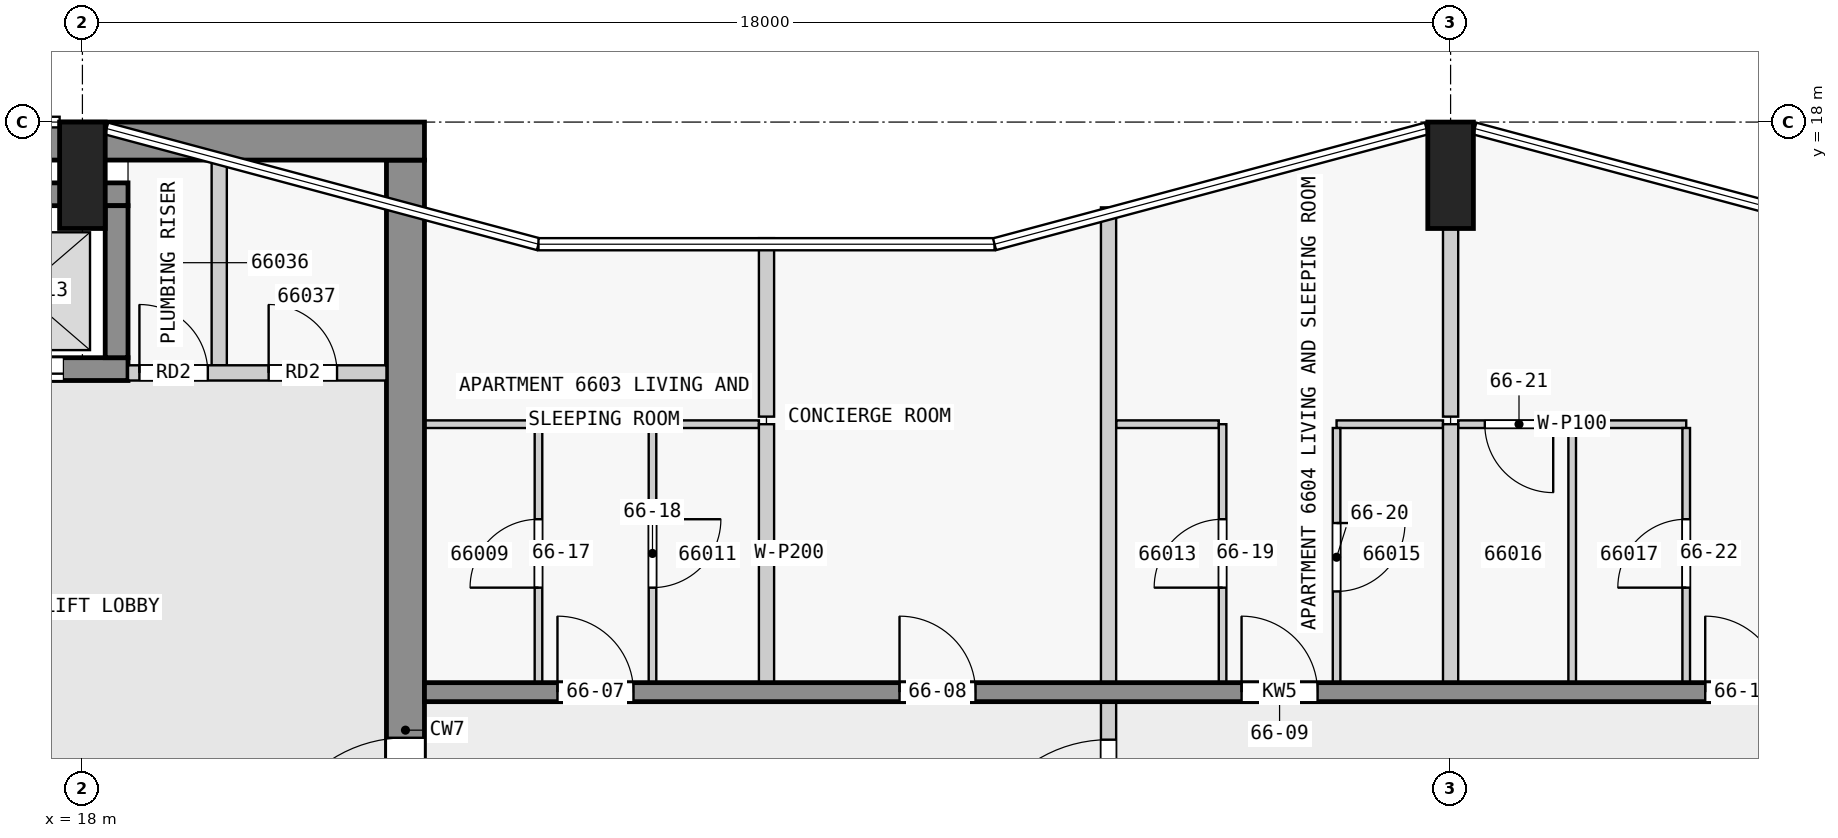
"""IFC4 building model, lengths in metres.
Left out: names, types, materials, properties, quantities, classifications, styles, units other than length and angle.
Written with IfcOpenShell. Run it as: python <this file> out.ifc"""

import sys

from ifc_helpers import new_model, si_unit, direction, frame, frame_2d, origin, origin_2d, place, context, subcontext, project, spatial, rectangle, extrude, element, fill, save


model = new_model("IFC4")
c1 = context("Model", 3, precision=1e-05, world=origin(), true_north=direction((0.0, 1.0)))
c2 = subcontext(c1, "Body", "Model", "MODEL_VIEW")
j1 = project(units=[si_unit("LENGTHUNIT", "METRE"), si_unit("PLANEANGLEUNIT", "RADIAN")], contexts=[c1])
p1 = place(None, origin())
s1 = spatial("IfcSite", under=j1, at=p1, CompositionType="ELEMENT")
p2 = place(p1, origin())
s2 = spatial("IfcBuilding", under=s1, at=p2, CompositionType="ELEMENT")
p3 = place(p2, frame((0.0, 0.0, 252.9)))
s3 = spatial("IfcBuildingStorey", under=s2, at=p3, CompositionType="ELEMENT", Elevation=252.9)
for number, where, z_axis, x_axis in (
    (1, (36.0, 17.3, 0.0), (0.0, 0.0, 1.0), (1.0, 0.0, 0.0)),
    (2, (18.0, 17.3, 0.0), (0.0, 0.0, 1.0), (1.0, 0.0, 0.0)),
):
    element("IfcColumn", number, at=place(p3, frame(where, z_axis=z_axis, x_axis=x_axis)), inside=s3, PredefinedType="COLUMN", context=c2, shape_type="SweptSolid", body=[
        extrude(rectangle(XDim=0.6, YDim=1.4, at=origin_2d()), origin(), (0.0, 0.0, 1.0), 3.5),
    ])
p4 = place(p3, frame((1.8, 17.75, 0.0), z_axis=(0.0, 0.0, 1.0), x_axis=(1.0, 0.0, 0.0)))
e3 = element("IfcWall", 3, at=p4, inside=s3, PredefinedType="SHEAR", context=c2, shape_type="SweptSolid", body=[
    extrude(rectangle(XDim=20.7, YDim=0.5, at=frame_2d((10.35, 0.0))), origin(), (0.0, 0.0, 1.0), 3.25),
])
p5 = place(p3, frame((22.25, 2.5, 0.0), z_axis=(0.0, 0.0, 1.0), x_axis=(0.0, 1.0, 0.0)))
e4 = element("IfcWall", 4, at=p5, inside=s3, PredefinedType="SHEAR", context=c2, shape_type="SweptSolid", body=[
    extrude(rectangle(XDim=15.0, YDim=0.5, at=frame_2d((7.5, 0.0))), origin(), (0.0, 0.0, 1.0), 3.25),
])
p6 = place(p5, frame((5.6, 0.0, 0.0)))
e5 = element("IfcOpeningElement", 5, at=p6, cuts=e4, PredefinedType="OPENING", context=c2, shape_type="SweptSolid", body=[
    extrude(rectangle(XDim=1.8, YDim=2.1, at=frame_2d((0.9, 1.05))), frame((0.0, 0.26, 0.0), z_axis=(0.0, -1.0, 0.0), x_axis=(1.0, 0.0, 0.0)), (0.0, 0.0, 1.0), 0.52),
])
p7 = place(p3, frame((10.8, 17.05, 0.0), z_axis=(0.0, 0.0, 1.0), x_axis=(1.0, 0.0, 0.0)))
e6 = element("IfcWall", 6, at=p7, inside=s3, PredefinedType="SHEAR", context=c2, shape_type="SweptSolid", body=[
    extrude(rectangle(XDim=7.8, YDim=0.3, at=frame_2d((3.9, 0.0))), origin(), (0.0, 0.0, 1.0), 3.25),
])
p8 = place(p3, frame((10.8, 14.75, 0.0), z_axis=(0.0, 0.0, 1.0), x_axis=(1.0, 0.0, 0.0)))
e7 = element("IfcWall", 7, at=p8, inside=s3, PredefinedType="SHEAR", context=c2, shape_type="SweptSolid", body=[
    extrude(rectangle(XDim=7.8, YDim=0.3, at=frame_2d((3.9, 0.0))), origin(), (0.0, 0.0, 1.0), 3.25),
])
p9 = place(p8, frame((0.85, 0.0, 0.0)))
e8 = element("IfcOpeningElement", 8, at=p9, cuts=e7, PredefinedType="OPENING", context=c2, shape_type="SweptSolid", body=[
    extrude(rectangle(XDim=1.1, YDim=2.1, at=frame_2d((0.55, 1.05))), frame((0.0, 0.16, 0.0), z_axis=(0.0, -1.0, 0.0), x_axis=(1.0, 0.0, 0.0)), (0.0, 0.0, 1.0), 0.32),
])
p10 = place(p8, frame((3.35, 0.0, 0.0)))
e9 = element("IfcOpeningElement", 9, at=p10, cuts=e7, PredefinedType="OPENING", context=c2, shape_type="SweptSolid", body=[
    extrude(rectangle(XDim=1.1, YDim=2.1, at=frame_2d((0.55, 1.05))), frame((0.0, 0.16, 0.0), z_axis=(0.0, -1.0, 0.0), x_axis=(1.0, 0.0, 0.0)), (0.0, 0.0, 1.0), 0.32),
])
p11 = place(p8, frame((5.85, 0.0, 0.0)))
e10 = element("IfcOpeningElement", 10, at=p11, cuts=e7, PredefinedType="OPENING", context=c2, shape_type="SweptSolid", body=[
    extrude(rectangle(XDim=1.1, YDim=2.1, at=frame_2d((0.55, 1.05))), frame((0.0, 0.16, 0.0), z_axis=(0.0, -1.0, 0.0), x_axis=(1.0, 0.0, 0.0)), (0.0, 0.0, 1.0), 0.32),
])
p12 = place(p3, frame((18.45, 14.9, 0.0), z_axis=(0.0, 0.0, 1.0), x_axis=(0.0, 1.0, 0.0)))
e11 = element("IfcWall", 11, at=p12, inside=s3, PredefinedType="SHEAR", context=c2, shape_type="SweptSolid", body=[
    extrude(rectangle(XDim=2.0, YDim=0.3, at=frame_2d((1.0, 0.0))), origin(), (0.0, 0.0, 1.0), 3.25),
])
p13 = place(p3, frame((22.5, 10.5, 0.0), z_axis=(0.0, 0.0, 1.0), x_axis=(1.0, 0.0, 0.0)))
e12 = element("IfcWall", 12, at=p13, inside=s3, PredefinedType="SHEAR", context=c2, shape_type="SweptSolid", body=[
    extrude(rectangle(XDim=22.5, YDim=0.25, at=frame_2d((11.25, 0.0))), origin(), (0.0, 0.0, 1.0), 3.25),
])
p14 = place(p13, frame((1.75, 0.0, 0.0)))
e13 = element("IfcOpeningElement", 13, at=p14, cuts=e12, PredefinedType="OPENING", context=c2, shape_type="SweptSolid", body=[
    extrude(rectangle(XDim=1.0, YDim=2.1, at=frame_2d((0.5, 1.05))), frame((0.0, 0.135, 0.0), z_axis=(0.0, -1.0, 0.0), x_axis=(1.0, 0.0, 0.0)), (0.0, 0.0, 1.0), 0.27),
])
p15 = place(p13, frame((6.25, 0.0, 0.0)))
e14 = element("IfcOpeningElement", 14, at=p15, cuts=e12, PredefinedType="OPENING", context=c2, shape_type="SweptSolid", body=[
    extrude(rectangle(XDim=1.0, YDim=2.1, at=frame_2d((0.5, 1.05))), frame((0.0, 0.135, 0.0), z_axis=(0.0, -1.0, 0.0), x_axis=(1.0, 0.0, 0.0)), (0.0, 0.0, 1.0), 0.27),
])
p16 = place(p13, frame((10.75, 0.0, 0.0)))
e15 = element("IfcOpeningElement", 15, at=p16, cuts=e12, PredefinedType="OPENING", context=c2, shape_type="SweptSolid", body=[
    extrude(rectangle(XDim=1.0, YDim=2.1, at=frame_2d((0.5, 1.05))), frame((0.0, 0.135, 0.0), z_axis=(0.0, -1.0, 0.0), x_axis=(1.0, 0.0, 0.0)), (0.0, 0.0, 1.0), 0.27),
])
p17 = place(p13, frame((16.85, 0.0, 0.0)))
e16 = element("IfcOpeningElement", 16, at=p17, cuts=e12, PredefinedType="OPENING", context=c2, shape_type="SweptSolid", body=[
    extrude(rectangle(XDim=1.0, YDim=2.1, at=frame_2d((0.5, 1.05))), frame((0.0, 0.135, 0.0), z_axis=(0.0, -1.0, 0.0), x_axis=(1.0, 0.0, 0.0)), (0.0, 0.0, 1.0), 0.27),
])
p18 = place(p3, frame((18.6, 14.7, 0.0), z_axis=(0.0, 0.0, 1.0), x_axis=(1.0, 0.0, 0.0)))
e17 = element("IfcWall", 17, at=p18, inside=s3, PredefinedType="PARTITIONING", context=c2, shape_type="SweptSolid", body=[
    extrude(rectangle(XDim=3.4, YDim=0.2, at=frame_2d((1.7, 0.0))), origin(), (0.0, 0.0, 1.0), 3.25),
])
p19 = place(p18, frame((0.15, 0.0, 0.0)))
e18 = element("IfcOpeningElement", 18, at=p19, cuts=e17, PredefinedType="OPENING", context=c2, shape_type="SweptSolid", body=[
    extrude(rectangle(XDim=0.9, YDim=2.1, at=frame_2d((0.45, 1.05))), frame((0.0, 0.11, 0.0), z_axis=(0.0, -1.0, 0.0), x_axis=(1.0, 0.0, 0.0)), (0.0, 0.0, 1.0), 0.22),
])
p20 = place(p18, frame((1.85, 0.0, 0.0)))
e19 = element("IfcOpeningElement", 19, at=p20, cuts=e17, PredefinedType="OPENING", context=c2, shape_type="SweptSolid", body=[
    extrude(rectangle(XDim=0.9, YDim=2.1, at=frame_2d((0.45, 1.05))), frame((0.0, 0.11, 0.0), z_axis=(0.0, -1.0, 0.0), x_axis=(1.0, 0.0, 0.0)), (0.0, 0.0, 1.0), 0.22),
])
p21 = place(p3, frame((19.8, 14.8, 0.0), z_axis=(0.0, 0.0, 1.0), x_axis=(0.0, 1.0, 0.0)))
e20 = element("IfcWall", 20, at=p21, inside=s3, PredefinedType="PARTITIONING", context=c2, shape_type="SweptSolid", body=[
    extrude(rectangle(XDim=2.7, YDim=0.2, at=frame_2d((1.35, 0.0))), origin(), (0.0, 0.0, 1.0), 3.25),
])
p22 = place(p3, frame((23.95, 14.025, 0.0), z_axis=(0.0, 0.0, 1.0), x_axis=(-1.0, 0.0, 0.0)))
e21 = element("IfcWall", 21, at=p22, inside=s3, PredefinedType="PARTITIONING", context=c2, shape_type="SweptSolid", body=[
    extrude(rectangle(XDim=1.45, YDim=0.1, at=frame_2d((0.725, 0.0))), origin(), (0.0, 0.0, 1.0), 3.25),
])
for number, where, z_axis, x_axis in (
    (22, (26.9, 14.025, 0.0), (0.0, 0.0, 1.0), (-1.0, 0.0, 0.0)),
    (23, (32.95, 14.025, 0.0), (0.0, 0.0, 1.0), (-1.0, 0.0, 0.0)),
):
    element("IfcWall", number, at=place(p3, frame(where, z_axis=z_axis, x_axis=x_axis)), inside=s3, PredefinedType="PARTITIONING", context=c2, shape_type="SweptSolid", body=[
        extrude(rectangle(XDim=1.35, YDim=0.1, at=frame_2d((0.675, 0.0))), origin(), (0.0, 0.0, 1.0), 3.25),
    ])
p23 = place(p3, frame((35.9, 14.025, 0.0), z_axis=(0.0, 0.0, 1.0), x_axis=(-1.0, 0.0, 0.0)))
e24 = element("IfcWall", 24, at=p23, inside=s3, PredefinedType="PARTITIONING", context=c2, shape_type="SweptSolid", body=[
    extrude(rectangle(XDim=1.4, YDim=0.1, at=frame_2d((0.7, 0.0))), origin(), (0.0, 0.0, 1.0), 3.25),
])
p24 = place(p3, frame((39.1, 14.025, 0.0), z_axis=(0.0, 0.0, 1.0), x_axis=(-1.0, 0.0, 0.0)))
e25 = element("IfcWall", 25, at=p24, inside=s3, PredefinedType="PARTITIONING", context=c2, shape_type="SweptSolid", body=[
    extrude(rectangle(XDim=3.0, YDim=0.1, at=frame_2d((1.5, 0.0))), origin(), (0.0, 0.0, 1.0), 3.25),
])
p25 = place(p24, frame((1.75, 0.0, 0.0)))
e26 = element("IfcOpeningElement", 26, at=p25, cuts=e25, PredefinedType="OPENING", context=c2, shape_type="SweptSolid", body=[
    extrude(rectangle(XDim=0.9, YDim=2.1, at=frame_2d((0.45, 1.05))), frame((0.0, 0.06, 0.0), z_axis=(0.0, -1.0, 0.0), x_axis=(1.0, 0.0, 0.0)), (0.0, 0.0, 1.0), 0.12),
])
p26 = place(p3, frame((24.0, 10.625, 0.0), z_axis=(0.0, 0.0, 1.0), x_axis=(0.0, 1.0, 0.0)))
e27 = element("IfcWall", 27, at=p26, inside=s3, PredefinedType="PARTITIONING", context=c2, shape_type="SweptSolid", body=[
    extrude(rectangle(XDim=3.4, YDim=0.1, at=frame_2d((1.7, 0.0))), origin(), (0.0, 0.0, 1.0), 3.25),
])
p27 = place(p26, frame((1.25, 0.0, 0.0)))
e28 = element("IfcOpeningElement", 28, at=p27, cuts=e27, PredefinedType="OPENING", context=c2, shape_type="SweptSolid", body=[
    extrude(rectangle(XDim=0.9, YDim=2.1, at=frame_2d((0.45, 1.05))), frame((0.0, 0.06, 0.0), z_axis=(0.0, -1.0, 0.0), x_axis=(1.0, 0.0, 0.0)), (0.0, 0.0, 1.0), 0.12),
])
p28 = place(p3, frame((25.5, 14.025, 0.0), z_axis=(0.0, 0.0, 1.0), x_axis=(0.0, -1.0, 0.0)))
e29 = element("IfcWall", 29, at=p28, inside=s3, PredefinedType="PARTITIONING", context=c2, shape_type="SweptSolid", body=[
    extrude(rectangle(XDim=3.4, YDim=0.1, at=frame_2d((1.7, 0.0))), origin(), (0.0, 0.0, 1.0), 3.25),
])
p29 = place(p28, frame((1.25, 0.0, 0.0)))
e30 = element("IfcOpeningElement", 30, at=p29, cuts=e29, PredefinedType="OPENING", context=c2, shape_type="SweptSolid", body=[
    extrude(rectangle(XDim=0.9, YDim=2.1, at=frame_2d((0.45, 1.05))), frame((0.0, 0.06, 0.0), z_axis=(0.0, -1.0, 0.0), x_axis=(1.0, 0.0, 0.0)), (0.0, 0.0, 1.0), 0.12),
])
p30 = place(p3, frame((27.0, 16.473, 0.0), z_axis=(0.0, 0.0, 1.0), x_axis=(0.0, -1.0, 0.0)))
e31 = element("IfcWall", 31, at=p30, inside=s3, PredefinedType="PARTITIONING", context=c2, shape_type="SweptSolid", body=[
    extrude(rectangle(XDim=2.348, YDim=0.2, at=frame_2d((1.174, 0.0))), origin(), (0.0, 0.0, 1.0), 3.25),
])
p31 = place(p3, frame((27.0, 10.625, 0.0), z_axis=(0.0, 0.0, 1.0), x_axis=(0.0, 1.0, 0.0)))
e32 = element("IfcWall", 32, at=p31, inside=s3, PredefinedType="PARTITIONING", context=c2, shape_type="SweptSolid", body=[
    extrude(rectangle(XDim=3.4, YDim=0.2, at=frame_2d((1.7, 0.0))), origin(), (0.0, 0.0, 1.0), 3.25),
])
p32 = place(p3, frame((31.5, 10.625, 0.0), z_axis=(0.0, 0.0, 1.0), x_axis=(0.0, 1.0, 0.0)))
e33 = element("IfcWall", 33, at=p32, inside=s3, PredefinedType="PARTITIONING", context=c2, shape_type="SweptSolid", body=[
    extrude(rectangle(XDim=6.253, YDim=0.2, at=frame_2d((3.126, 0.0))), origin(), (0.0, 0.0, 1.0), 3.25),
])
p33 = place(p3, frame((33.0, 10.625, 0.0), z_axis=(0.0, 0.0, 1.0), x_axis=(0.0, 1.0, 0.0)))
e34 = element("IfcWall", 34, at=p33, inside=s3, PredefinedType="PARTITIONING", context=c2, shape_type="SweptSolid", body=[
    extrude(rectangle(XDim=3.4, YDim=0.1, at=frame_2d((1.7, 0.0))), origin(), (0.0, 0.0, 1.0), 3.25),
])
p34 = place(p33, frame((1.25, 0.0, 0.0)))
e35 = element("IfcOpeningElement", 35, at=p34, cuts=e34, PredefinedType="OPENING", context=c2, shape_type="SweptSolid", body=[
    extrude(rectangle(XDim=0.9, YDim=2.1, at=frame_2d((0.45, 1.05))), frame((0.0, 0.06, 0.0), z_axis=(0.0, -1.0, 0.0), x_axis=(1.0, 0.0, 0.0)), (0.0, 0.0, 1.0), 0.12),
])
p35 = place(p3, frame((34.5, 13.975, 0.0), z_axis=(0.0, 0.0, 1.0), x_axis=(0.0, -1.0, 0.0)))
e36 = element("IfcWall", 36, at=p35, inside=s3, PredefinedType="PARTITIONING", context=c2, shape_type="SweptSolid", body=[
    extrude(rectangle(XDim=3.35, YDim=0.1, at=frame_2d((1.675, 0.0))), origin(), (0.0, 0.0, 1.0), 3.25),
])
p36 = place(p35, frame((1.25, 0.0, 0.0)))
e37 = element("IfcOpeningElement", 37, at=p36, cuts=e36, PredefinedType="OPENING", context=c2, shape_type="SweptSolid", body=[
    extrude(rectangle(XDim=0.9, YDim=2.1, at=frame_2d((0.45, 1.05))), frame((0.0, 0.06, 0.0), z_axis=(0.0, -1.0, 0.0), x_axis=(1.0, 0.0, 0.0)), (0.0, 0.0, 1.0), 0.12),
])
p37 = place(p3, frame((36.0, 16.6, 0.0), z_axis=(0.0, 0.0, 1.0), x_axis=(0.0, -1.0, 0.0)))
e38 = element("IfcWall", 38, at=p37, inside=s3, PredefinedType="PARTITIONING", context=c2, shape_type="SweptSolid", body=[
    extrude(rectangle(XDim=2.475, YDim=0.2, at=frame_2d((1.238, 0.0))), origin(), (0.0, 0.0, 1.0), 3.25),
])
p38 = place(p3, frame((36.0, 10.625, 0.0), z_axis=(0.0, 0.0, 1.0), x_axis=(0.0, 1.0, 0.0)))
e39 = element("IfcWall", 39, at=p38, inside=s3, PredefinedType="PARTITIONING", context=c2, shape_type="SweptSolid", body=[
    extrude(rectangle(XDim=3.4, YDim=0.2, at=frame_2d((1.7, 0.0))), origin(), (0.0, 0.0, 1.0), 3.25),
])
p39 = place(p3, frame((37.6, 10.625, 0.0), z_axis=(0.0, 0.0, 1.0), x_axis=(0.0, 1.0, 0.0)))
e40 = element("IfcWall", 40, at=p39, inside=s3, PredefinedType="PARTITIONING", context=c2, shape_type="SweptSolid", body=[
    extrude(rectangle(XDim=3.35, YDim=0.1, at=frame_2d((1.675, 0.0))), origin(), (0.0, 0.0, 1.0), 3.25),
])
p40 = place(p3, frame((39.1, 10.625, 0.0), z_axis=(0.0, 0.0, 1.0), x_axis=(0.0, 1.0, 0.0)))
e41 = element("IfcWall", 41, at=p40, inside=s3, PredefinedType="PARTITIONING", context=c2, shape_type="SweptSolid", body=[
    extrude(rectangle(XDim=3.35, YDim=0.1, at=frame_2d((1.675, 0.0))), origin(), (0.0, 0.0, 1.0), 3.25),
])
p41 = place(p40, frame((1.25, 0.0, 0.0)))
e42 = element("IfcOpeningElement", 42, at=p41, cuts=e41, PredefinedType="OPENING", context=c2, shape_type="SweptSolid", body=[
    extrude(rectangle(XDim=0.9, YDim=2.1, at=frame_2d((0.45, 1.05))), frame((0.0, 0.06, 0.0), z_axis=(0.0, -1.0, 0.0), x_axis=(1.0, 0.0, 0.0)), (0.0, 0.0, 1.0), 0.12),
])
p42 = place(p3, frame((31.5, 7.475, 0.0), z_axis=(0.0, 0.0, 1.0), x_axis=(0.0, 1.0, 0.0)))
e43 = element("IfcWall", 43, at=p42, inside=s3, PredefinedType="PARTITIONING", context=c2, shape_type="SweptSolid", body=[
    extrude(rectangle(XDim=3.05, YDim=0.2, at=frame_2d((1.525, 0.0))), origin(), (0.0, 0.0, 1.0), 3.25),
])
p43 = place(p42, frame((0.6, 0.0, 0.0)))
e44 = element("IfcOpeningElement", 44, at=p43, cuts=e43, PredefinedType="OPENING", context=c2, shape_type="SweptSolid", body=[
    extrude(rectangle(XDim=1.8, YDim=2.1, at=frame_2d((0.9, 1.05))), frame((0.0, 0.11, 0.0), z_axis=(0.0, -1.0, 0.0), x_axis=(1.0, 0.0, 0.0)), (0.0, 0.0, 1.0), 0.22),
])
p44 = place(p11, origin())
e45 = element("IfcDoor", 45, at=p44, inside=s3, OperationType="DOUBLE_DOOR_SLIDING", PredefinedType="DOOR", context=c2, shape_type="SweptSolid", body=[
    extrude(rectangle(XDim=1.1, YDim=2.1, at=frame_2d((0.55, 1.05))), frame((0.0, 0.025, 0.0), z_axis=(0.0, -1.0, 0.0), x_axis=(1.0, 0.0, 0.0)), (0.0, 0.0, 1.0), 0.05),
])
fill(e10, e45)
p45 = place(p6, origin())
e46 = element("IfcDoor", 46, at=p45, inside=s3, OperationType="DOUBLE_DOOR_SINGLE_SWING", PredefinedType="DOOR", context=c2, shape_type="SweptSolid", body=[
    extrude(rectangle(XDim=1.8, YDim=2.1, at=frame_2d((0.9, 1.05))), frame((0.0, 0.025, 0.0), z_axis=(0.0, -1.0, 0.0), x_axis=(1.0, 0.0, 0.0)), (0.0, 0.0, 1.0), 0.05),
])
fill(e5, e46)
p46 = place(p19, origin())
e47 = element("IfcDoor", 47, at=p46, inside=s3, OperationType="SINGLE_SWING_LEFT", PredefinedType="DOOR", context=c2, shape_type="SweptSolid", body=[
    extrude(rectangle(XDim=0.9, YDim=2.1, at=frame_2d((0.45, 1.05))), frame((0.0, 0.025, 0.0), z_axis=(0.0, -1.0, 0.0), x_axis=(1.0, 0.0, 0.0)), (0.0, 0.0, 1.0), 0.05),
])
fill(e18, e47)
p47 = place(p20, origin())
e48 = element("IfcDoor", 48, at=p47, inside=s3, OperationType="SINGLE_SWING_LEFT", PredefinedType="DOOR", context=c2, shape_type="SweptSolid", body=[
    extrude(rectangle(XDim=0.9, YDim=2.1, at=frame_2d((0.45, 1.05))), frame((0.0, 0.025, 0.0), z_axis=(0.0, -1.0, 0.0), x_axis=(1.0, 0.0, 0.0)), (0.0, 0.0, 1.0), 0.05),
])
fill(e19, e48)
p48 = place(p14, origin())
e49 = element("IfcDoor", 49, at=p48, inside=s3, OperationType="SINGLE_SWING_LEFT", PredefinedType="DOOR", context=c2, shape_type="SweptSolid", body=[
    extrude(rectangle(XDim=1.0, YDim=2.1, at=frame_2d((0.5, 1.05))), frame((0.0, 0.025, 0.0), z_axis=(0.0, -1.0, 0.0), x_axis=(1.0, 0.0, 0.0)), (0.0, 0.0, 1.0), 0.05),
])
fill(e13, e49)
p49 = place(p15, origin())
e50 = element("IfcDoor", 50, at=p49, inside=s3, OperationType="SINGLE_SWING_LEFT", PredefinedType="DOOR", context=c2, shape_type="SweptSolid", body=[
    extrude(rectangle(XDim=1.0, YDim=2.1, at=frame_2d((0.5, 1.05))), frame((0.0, 0.025, 0.0), z_axis=(0.0, -1.0, 0.0), x_axis=(1.0, 0.0, 0.0)), (0.0, 0.0, 1.0), 0.05),
])
fill(e14, e50)
p50 = place(p16, origin())
e51 = element("IfcDoor", 51, at=p50, inside=s3, OperationType="SINGLE_SWING_LEFT", PredefinedType="DOOR", context=c2, shape_type="SweptSolid", body=[
    extrude(rectangle(XDim=1.0, YDim=2.1, at=frame_2d((0.5, 1.05))), frame((0.0, 0.025, 0.0), z_axis=(0.0, -1.0, 0.0), x_axis=(1.0, 0.0, 0.0)), (0.0, 0.0, 1.0), 0.05),
])
fill(e15, e51)
p51 = place(p17, origin())
e52 = element("IfcDoor", 52, at=p51, inside=s3, OperationType="SINGLE_SWING_RIGHT", PredefinedType="DOOR", context=c2, shape_type="SweptSolid", body=[
    extrude(rectangle(XDim=1.0, YDim=2.1, at=frame_2d((0.5, 1.05))), frame((0.0, 0.025, 0.0), z_axis=(0.0, -1.0, 0.0), x_axis=(1.0, 0.0, 0.0)), (0.0, 0.0, 1.0), 0.05),
])
fill(e16, e52)
p52 = place(p43, origin())
e53 = element("IfcDoor", 53, at=p52, inside=s3, OperationType="SINGLE_SWING_LEFT", PredefinedType="DOOR", context=c2, shape_type="SweptSolid", body=[
    extrude(rectangle(XDim=1.8, YDim=2.1, at=frame_2d((0.9, 1.05))), frame((0.0, 0.025, 0.0), z_axis=(0.0, -1.0, 0.0), x_axis=(1.0, 0.0, 0.0)), (0.0, 0.0, 1.0), 0.05),
])
fill(e44, e53)
p53 = place(p27, origin())
e54 = element("IfcDoor", 54, at=p53, inside=s3, OperationType="SINGLE_SWING_LEFT", PredefinedType="DOOR", context=c2, shape_type="SweptSolid", body=[
    extrude(rectangle(XDim=0.9, YDim=2.1, at=frame_2d((0.45, 1.05))), frame((0.0, 0.025, 0.0), z_axis=(0.0, -1.0, 0.0), x_axis=(1.0, 0.0, 0.0)), (0.0, 0.0, 1.0), 0.05),
])
fill(e28, e54)
p54 = place(p29, origin())
e55 = element("IfcDoor", 55, at=p54, inside=s3, OperationType="SINGLE_SWING_LEFT", PredefinedType="DOOR", context=c2, shape_type="SweptSolid", body=[
    extrude(rectangle(XDim=0.9, YDim=2.1, at=frame_2d((0.45, 1.05))), frame((0.0, 0.025, 0.0), z_axis=(0.0, -1.0, 0.0), x_axis=(1.0, 0.0, 0.0)), (0.0, 0.0, 1.0), 0.05),
])
fill(e30, e55)
p55 = place(p34, origin())
e56 = element("IfcDoor", 56, at=p55, inside=s3, OperationType="SINGLE_SWING_LEFT", PredefinedType="DOOR", context=c2, shape_type="SweptSolid", body=[
    extrude(rectangle(XDim=0.9, YDim=2.1, at=frame_2d((0.45, 1.05))), frame((0.0, 0.025, 0.0), z_axis=(0.0, -1.0, 0.0), x_axis=(1.0, 0.0, 0.0)), (0.0, 0.0, 1.0), 0.05),
])
fill(e35, e56)
p56 = place(p36, origin())
e57 = element("IfcDoor", 57, at=p56, inside=s3, OperationType="SINGLE_SWING_RIGHT", PredefinedType="DOOR", context=c2, shape_type="SweptSolid", body=[
    extrude(rectangle(XDim=0.9, YDim=2.1, at=frame_2d((0.45, 1.05))), frame((0.0, 0.025, 0.0), z_axis=(0.0, -1.0, 0.0), x_axis=(1.0, 0.0, 0.0)), (0.0, 0.0, 1.0), 0.05),
])
fill(e37, e57)
p57 = place(p25, origin())
e58 = element("IfcDoor", 58, at=p57, inside=s3, OperationType="SINGLE_SWING_RIGHT", PredefinedType="DOOR", context=c2, shape_type="SweptSolid", body=[
    extrude(rectangle(XDim=0.9, YDim=2.1, at=frame_2d((0.45, 1.05))), frame((0.0, 0.025, 0.0), z_axis=(0.0, -1.0, 0.0), x_axis=(1.0, 0.0, 0.0)), (0.0, 0.0, 1.0), 0.05),
])
fill(e26, e58)
p58 = place(p41, origin())
e59 = element("IfcDoor", 59, at=p58, inside=s3, OperationType="SINGLE_SWING_RIGHT", PredefinedType="DOOR", context=c2, shape_type="SweptSolid", body=[
    extrude(rectangle(XDim=0.9, YDim=2.1, at=frame_2d((0.45, 1.05))), frame((0.0, 0.025, 0.0), z_axis=(0.0, -1.0, 0.0), x_axis=(1.0, 0.0, 0.0)), (0.0, 0.0, 1.0), 0.05),
])
fill(e42, e59)
save(model, sys.argv[1])
